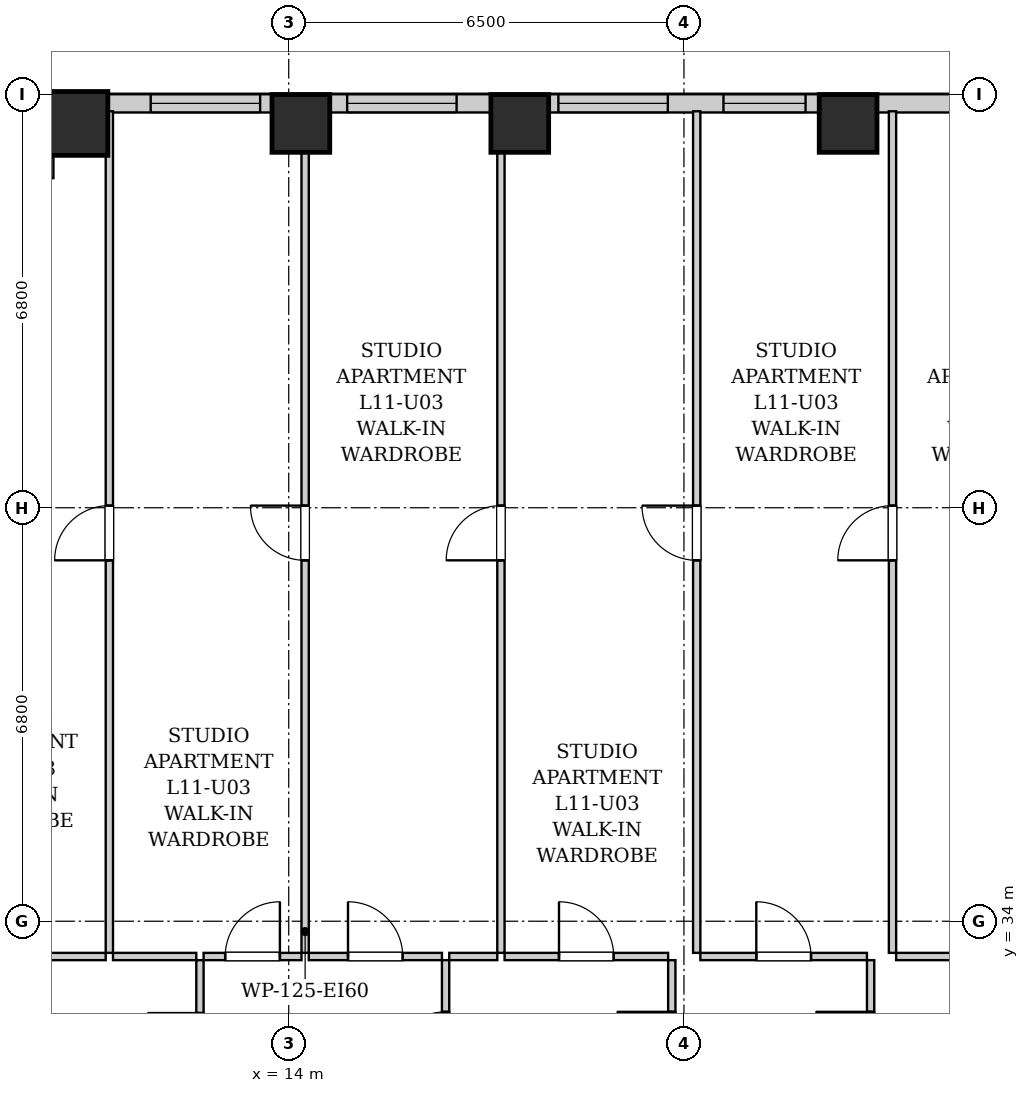
"""IFC4 building model, lengths in metres.
Left out: names, types, materials, properties, quantities, classifications, styles, units other than length and angle.
Written with IfcOpenShell. Run it as: python <this file> out.ifc"""

import sys

from ifc_helpers import new_model, si_unit, direction, frame, frame_2d, origin, origin_2d, place, context, subcontext, project, spatial, rectangle, extrude, element, fill, save


model = new_model("IFC4")
c1 = context("Model", 3, precision=1e-05, world=origin(), true_north=direction((0.0, 1.0)))
c2 = subcontext(c1, "Body", "Model", "MODEL_VIEW")
j1 = project(units=[si_unit("LENGTHUNIT", "METRE"), si_unit("PLANEANGLEUNIT", "RADIAN")], contexts=[c1])
p1 = place(None, origin())
s1 = spatial("IfcSite", under=j1, at=p1, CompositionType="ELEMENT")
p2 = place(p1, origin())
s2 = spatial("IfcBuilding", under=s1, at=p2, CompositionType="ELEMENT")
p3 = place(p2, frame((0.0, 0.0, 45.0)))
s3 = spatial("IfcBuildingStorey", under=s2, at=p3, CompositionType="ELEMENT", Elevation=45.0)
p4 = place(p3, frame((10.5, 47.12, 0.0), z_axis=(0.0, 0.0, 1.0), x_axis=(1.0, 0.0, 0.0)))
e1 = element("IfcColumn", 1, at=p4, inside=s3, PredefinedType="COLUMN", context=c2, shape_type="SweptSolid", body=[
    extrude(rectangle(XDim=1.05, YDim=1.05, at=origin_2d()), origin(), (0.0, 0.0, 1.0), 3.2),
])
for number, where, z_axis, x_axis in (
    (2, (14.2, 47.12, 0.0), (0.0, 0.0, 1.0), (1.0, 0.0, 0.0)),
    (3, (17.8, 47.12, 0.0), (0.0, 0.0, 1.0), (1.0, 0.0, 0.0)),
    (4, (23.2, 47.12, 0.0), (0.0, 0.0, 1.0), (1.0, 0.0, 0.0)),
):
    element("IfcColumn", number, at=place(p3, frame(where, z_axis=z_axis, x_axis=x_axis)), inside=s3, PredefinedType="COLUMN", context=c2, shape_type="SweptSolid", body=[
        extrude(rectangle(XDim=0.95, YDim=0.95, at=origin_2d()), origin(), (0.0, 0.0, 1.0), 3.2),
    ])
p5 = place(p3, frame((10.0, 47.45, 0.0), z_axis=(0.0, 0.0, 1.0), x_axis=(1.0, 0.0, 0.0)))
e5 = element("IfcWall", 5, at=p5, inside=s3, PredefinedType="SOLIDWALL", context=c2, shape_type="SweptSolid", body=[
    extrude(rectangle(XDim=25.7, YDim=0.3, at=frame_2d((12.85, 0.0))), origin(), (0.0, 0.0, 1.0), 1.975),
])
p6 = place(p5, frame((1.73, 0.0, 0.55)))
e6 = element("IfcOpeningElement", 6, at=p6, cuts=e5, PredefinedType="OPENING", context=c2, shape_type="SweptSolid", body=[
    extrude(rectangle(XDim=1.8, YDim=1.2, at=frame_2d((0.9, 0.6))), frame((0.0, 0.16, 0.0), z_axis=(0.0, -1.0, 0.0), x_axis=(1.0, 0.0, 0.0)), (0.0, 0.0, 1.0), 0.32),
])
p7 = place(p5, frame((4.961, 0.0, 0.55)))
e7 = element("IfcOpeningElement", 7, at=p7, cuts=e5, PredefinedType="OPENING", context=c2, shape_type="SweptSolid", body=[
    extrude(rectangle(XDim=1.8, YDim=1.2, at=frame_2d((0.9, 0.6))), frame((0.0, 0.16, 0.0), z_axis=(0.0, -1.0, 0.0), x_axis=(1.0, 0.0, 0.0)), (0.0, 0.0, 1.0), 0.32),
])
p8 = place(p5, frame((8.435, 0.0, 0.55)))
e8 = element("IfcOpeningElement", 8, at=p8, cuts=e5, PredefinedType="OPENING", context=c2, shape_type="SweptSolid", body=[
    extrude(rectangle(XDim=1.8, YDim=1.2, at=frame_2d((0.9, 0.6))), frame((0.0, 0.16, 0.0), z_axis=(0.0, -1.0, 0.0), x_axis=(1.0, 0.0, 0.0)), (0.0, 0.0, 1.0), 0.32),
])
p9 = place(p5, frame((11.15, 0.0, 0.55)))
e9 = element("IfcOpeningElement", 9, at=p9, cuts=e5, PredefinedType="OPENING", context=c2, shape_type="SweptSolid", body=[
    extrude(rectangle(XDim=1.35, YDim=1.2, at=frame_2d((0.675, 0.6))), frame((0.0, 0.16, 0.0), z_axis=(0.0, -1.0, 0.0), x_axis=(1.0, 0.0, 0.0)), (0.0, 0.0, 1.0), 0.32),
])
p10 = place(p5, frame((17.812, 0.0, 0.55)))
e10 = element("IfcOpeningElement", 10, at=p10, cuts=e5, PredefinedType="OPENING", context=c2, shape_type="SweptSolid", body=[
    extrude(rectangle(XDim=1.8, YDim=1.2, at=frame_2d((0.9, 0.6))), frame((0.0, 0.16, 0.0), z_axis=(0.0, -1.0, 0.0), x_axis=(1.0, 0.0, 0.0)), (0.0, 0.0, 1.0), 0.32),
])
p11 = place(p5, frame((20.765, 0.0, 0.55)))
e11 = element("IfcOpeningElement", 11, at=p11, cuts=e5, PredefinedType="OPENING", context=c2, shape_type="SweptSolid", body=[
    extrude(rectangle(XDim=1.8, YDim=1.2, at=frame_2d((0.9, 0.6))), frame((0.0, 0.16, 0.0), z_axis=(0.0, -1.0, 0.0), x_axis=(1.0, 0.0, 0.0)), (0.0, 0.0, 1.0), 0.32),
])
p12 = place(p5, frame((23.835, 0.0, 0.55)))
e12 = element("IfcOpeningElement", 12, at=p12, cuts=e5, PredefinedType="OPENING", context=c2, shape_type="SweptSolid", body=[
    extrude(rectangle(XDim=1.35, YDim=1.2, at=frame_2d((0.675, 0.6))), frame((0.0, 0.16, 0.0), z_axis=(0.0, -1.0, 0.0), x_axis=(1.0, 0.0, 0.0)), (0.0, 0.0, 1.0), 0.32),
])
p13 = place(p3, frame((10.0, 46.22, 0.0), z_axis=(0.0, 0.0, 1.0), x_axis=(0.0, 1.0, 0.0)))
e13 = element("IfcWall", 13, at=p13, inside=s3, PredefinedType="SOLIDWALL", context=c2, shape_type="SweptSolid", body=[
    extrude(rectangle(XDim=1.078, YDim=0.26, at=frame_2d((0.539, 0.0))), origin(), (0.0, 0.0, 1.0), 2.94),
])
p14 = place(p3, frame((12.54, 30.76, 0.0), z_axis=(0.0, 0.0, 1.0), x_axis=(0.0, 1.0, 0.0)))
e14 = element("IfcWall", 14, at=p14, inside=s3, PredefinedType="PARTITIONING", context=c2, shape_type="SweptSolid", body=[
    extrude(rectangle(XDim=2.6, YDim=0.12, at=frame_2d((1.3, 0.0))), origin(), (0.0, 0.0, 1.0), 2.94),
])
p15 = place(p14, frame((0.87, 0.0, 0.0)))
e15 = element("IfcOpeningElement", 15, at=p15, cuts=e14, PredefinedType="OPENING", context=c2, shape_type="SweptSolid", body=[
    extrude(rectangle(XDim=0.86, YDim=2.05, at=frame_2d((0.43, 1.025))), frame((0.0, 0.07, 0.0), z_axis=(0.0, -1.0, 0.0), x_axis=(1.0, 0.0, 0.0)), (0.0, 0.0, 1.0), 0.14),
])
p16 = place(p3, frame((10.08, 33.42, 0.0), z_axis=(0.0, 0.0, 1.0), x_axis=(1.0, 0.0, 0.0)))
e16 = element("IfcWall", 16, at=p16, inside=s3, PredefinedType="PARTITIONING", context=c2, shape_type="SweptSolid", body=[
    extrude(rectangle(XDim=0.91, YDim=0.12, at=frame_2d((0.455, 0.0))), origin(), (0.0, 0.0, 1.0), 2.94),
])
p17 = place(p3, frame((11.11, 33.42, 0.0), z_axis=(0.0, 0.0, 1.0), x_axis=(1.0, 0.0, 0.0)))
e17 = element("IfcWall", 17, at=p17, inside=s3, PredefinedType="PARTITIONING", context=c2, shape_type="SweptSolid", body=[
    extrude(rectangle(XDim=1.37, YDim=0.12, at=frame_2d((0.685, 0.0))), origin(), (0.0, 0.0, 1.0), 2.94),
])
p18 = place(p3, frame((16.58, 30.76, 0.0), z_axis=(0.0, 0.0, 1.0), x_axis=(0.0, 1.0, 0.0)))
e18 = element("IfcWall", 18, at=p18, inside=s3, PredefinedType="PARTITIONING", context=c2, shape_type="SweptSolid", body=[
    extrude(rectangle(XDim=2.6, YDim=0.12, at=frame_2d((1.3, 0.0))), origin(), (0.0, 0.0, 1.0), 2.94),
])
p19 = place(p18, frame((0.85, 0.0, 0.0)))
e19 = element("IfcOpeningElement", 19, at=p19, cuts=e18, PredefinedType="OPENING", context=c2, shape_type="SweptSolid", body=[
    extrude(rectangle(XDim=0.9, YDim=2.05, at=frame_2d((0.45, 1.025))), frame((0.0, 0.07, 0.0), z_axis=(0.0, -1.0, 0.0), x_axis=(1.0, 0.0, 0.0)), (0.0, 0.0, 1.0), 0.14),
])
p20 = place(p3, frame((12.6, 33.42, 0.0), z_axis=(0.0, 0.0, 1.0), x_axis=(1.0, 0.0, 0.0)))
e20 = element("IfcWall", 20, at=p20, inside=s3, PredefinedType="PARTITIONING", context=c2, shape_type="SweptSolid", body=[
    extrude(rectangle(XDim=1.61, YDim=0.12, at=frame_2d((0.805, 0.0))), origin(), (0.0, 0.0, 1.0), 2.94),
])
p21 = place(p20, frame((0.355, 0.0, 0.0)))
e21 = element("IfcOpeningElement", 21, at=p21, cuts=e20, PredefinedType="OPENING", context=c2, shape_type="SweptSolid", body=[
    extrude(rectangle(XDim=0.9, YDim=2.05, at=frame_2d((0.45, 1.025))), frame((0.0, 0.07, 0.0), z_axis=(0.0, -1.0, 0.0), x_axis=(1.0, 0.0, 0.0)), (0.0, 0.0, 1.0), 0.14),
])
p22 = place(p3, frame((14.33, 33.42, 0.0), z_axis=(0.0, 0.0, 1.0), x_axis=(1.0, 0.0, 0.0)))
e22 = element("IfcWall", 22, at=p22, inside=s3, PredefinedType="PARTITIONING", context=c2, shape_type="SweptSolid", body=[
    extrude(rectangle(XDim=2.19, YDim=0.12, at=frame_2d((1.095, 0.0))), origin(), (0.0, 0.0, 1.0), 2.94),
])
p23 = place(p22, frame((0.645, 0.0, 0.0)))
e23 = element("IfcOpeningElement", 23, at=p23, cuts=e22, PredefinedType="OPENING", context=c2, shape_type="SweptSolid", body=[
    extrude(rectangle(XDim=0.9, YDim=2.05, at=frame_2d((0.45, 1.025))), frame((0.0, 0.07, 0.0), z_axis=(0.0, -1.0, 0.0), x_axis=(1.0, 0.0, 0.0)), (0.0, 0.0, 1.0), 0.14),
])
p24 = place(p3, frame((20.3, 30.76, 0.0), z_axis=(0.0, 0.0, 1.0), x_axis=(0.0, 1.0, 0.0)))
e24 = element("IfcWall", 24, at=p24, inside=s3, PredefinedType="PARTITIONING", context=c2, shape_type="SweptSolid", body=[
    extrude(rectangle(XDim=2.6, YDim=0.12, at=frame_2d((1.3, 0.0))), origin(), (0.0, 0.0, 1.0), 2.94),
])
p25 = place(p24, frame((0.85, 0.0, 0.0)))
e25 = element("IfcOpeningElement", 25, at=p25, cuts=e24, PredefinedType="OPENING", context=c2, shape_type="SweptSolid", body=[
    extrude(rectangle(XDim=0.9, YDim=2.05, at=frame_2d((0.45, 1.025))), frame((0.0, 0.07, 0.0), z_axis=(0.0, -1.0, 0.0), x_axis=(1.0, 0.0, 0.0)), (0.0, 0.0, 1.0), 0.14),
])
p26 = place(p3, frame((16.64, 33.42, 0.0), z_axis=(0.0, 0.0, 1.0), x_axis=(1.0, 0.0, 0.0)))
e26 = element("IfcWall", 26, at=p26, inside=s3, PredefinedType="PARTITIONING", context=c2, shape_type="SweptSolid", body=[
    extrude(rectangle(XDim=0.79, YDim=0.12, at=frame_2d((0.395, 0.0))), origin(), (0.0, 0.0, 1.0), 2.94),
])
p27 = place(p3, frame((17.55, 33.42, 0.0), z_axis=(0.0, 0.0, 1.0), x_axis=(1.0, 0.0, 0.0)))
e27 = element("IfcWall", 27, at=p27, inside=s3, PredefinedType="PARTITIONING", context=c2, shape_type="SweptSolid", body=[
    extrude(rectangle(XDim=2.69, YDim=0.12, at=frame_2d((1.345, 0.0))), origin(), (0.0, 0.0, 1.0), 2.94),
])
p28 = place(p27, frame((0.895, 0.0, 0.0)))
e28 = element("IfcOpeningElement", 28, at=p28, cuts=e27, PredefinedType="OPENING", context=c2, shape_type="SweptSolid", body=[
    extrude(rectangle(XDim=0.9, YDim=2.05, at=frame_2d((0.45, 1.025))), frame((0.0, 0.07, 0.0), z_axis=(0.0, -1.0, 0.0), x_axis=(1.0, 0.0, 0.0)), (0.0, 0.0, 1.0), 0.14),
])
p29 = place(p3, frame((23.57, 30.76, 0.0), z_axis=(0.0, 0.0, 1.0), x_axis=(0.0, 1.0, 0.0)))
e29 = element("IfcWall", 29, at=p29, inside=s3, PredefinedType="PARTITIONING", context=c2, shape_type="SweptSolid", body=[
    extrude(rectangle(XDim=2.6, YDim=0.12, at=frame_2d((1.3, 0.0))), origin(), (0.0, 0.0, 1.0), 2.94),
])
p30 = place(p29, frame((0.85, 0.0, 0.0)))
e30 = element("IfcOpeningElement", 30, at=p30, cuts=e29, PredefinedType="OPENING", context=c2, shape_type="SweptSolid", body=[
    extrude(rectangle(XDim=0.9, YDim=2.05, at=frame_2d((0.45, 1.025))), frame((0.0, 0.07, 0.0), z_axis=(0.0, -1.0, 0.0), x_axis=(1.0, 0.0, 0.0)), (0.0, 0.0, 1.0), 0.14),
])
p31 = place(p3, frame((20.77, 33.42, 0.0), z_axis=(0.0, 0.0, 1.0), x_axis=(1.0, 0.0, 0.0)))
e31 = element("IfcWall", 31, at=p31, inside=s3, PredefinedType="PARTITIONING", context=c2, shape_type="SweptSolid", body=[
    extrude(rectangle(XDim=2.74, YDim=0.12, at=frame_2d((1.37, 0.0))), origin(), (0.0, 0.0, 1.0), 2.94),
])
p32 = place(p31, frame((0.92, 0.0, 0.0)))
e32 = element("IfcOpeningElement", 32, at=p32, cuts=e31, PredefinedType="OPENING", context=c2, shape_type="SweptSolid", body=[
    extrude(rectangle(XDim=0.9, YDim=2.05, at=frame_2d((0.45, 1.025))), frame((0.0, 0.07, 0.0), z_axis=(0.0, -1.0, 0.0), x_axis=(1.0, 0.0, 0.0)), (0.0, 0.0, 1.0), 0.14),
])
p33 = place(p3, frame((23.99, 33.42, 0.0), z_axis=(0.0, 0.0, 1.0), x_axis=(1.0, 0.0, 0.0)))
e33 = element("IfcWall", 33, at=p33, inside=s3, PredefinedType="PARTITIONING", context=c2, shape_type="SweptSolid", body=[
    extrude(rectangle(XDim=3.1, YDim=0.12, at=frame_2d((1.55, 0.0))), origin(), (0.0, 0.0, 1.0), 2.94),
])
p34 = place(p33, frame((1.1, 0.0, 0.0)))
e34 = element("IfcOpeningElement", 34, at=p34, cuts=e33, PredefinedType="OPENING", context=c2, shape_type="SweptSolid", body=[
    extrude(rectangle(XDim=0.9, YDim=2.05, at=frame_2d((0.45, 1.025))), frame((0.0, 0.07, 0.0), z_axis=(0.0, -1.0, 0.0), x_axis=(1.0, 0.0, 0.0)), (0.0, 0.0, 1.0), 0.14),
])
p35 = place(p3, frame((11.05, 33.48, 0.0), z_axis=(0.0, 0.0, 1.0), x_axis=(0.0, 1.0, 0.0)))
e35 = element("IfcWall", 35, at=p35, inside=s3, PredefinedType="PARTITIONING", context=c2, shape_type="SweptSolid", body=[
    extrude(rectangle(XDim=13.84, YDim=0.12, at=frame_2d((6.92, 0.0))), origin(), (0.0, 0.0, 1.0), 2.94),
])
p36 = place(p35, frame((6.455, 0.0, 0.0)))
e36 = element("IfcOpeningElement", 36, at=p36, cuts=e35, PredefinedType="OPENING", context=c2, shape_type="SweptSolid", body=[
    extrude(rectangle(XDim=0.9, YDim=2.05, at=frame_2d((0.45, 1.025))), frame((0.0, 0.07, 0.0), z_axis=(0.0, -1.0, 0.0), x_axis=(1.0, 0.0, 0.0)), (0.0, 0.0, 1.0), 0.14),
])
p37 = place(p3, frame((14.27, 33.48, 0.0), z_axis=(0.0, 0.0, 1.0), x_axis=(0.0, 1.0, 0.0)))
e37 = element("IfcWall", 37, at=p37, inside=s3, PredefinedType="PARTITIONING", context=c2, shape_type="SweptSolid", body=[
    extrude(rectangle(XDim=13.84, YDim=0.12, at=frame_2d((6.92, 0.0))), origin(), (0.0, 0.0, 1.0), 2.94),
])
p38 = place(p37, frame((6.455, 0.0, 0.0)))
e38 = element("IfcOpeningElement", 38, at=p38, cuts=e37, PredefinedType="OPENING", context=c2, shape_type="SweptSolid", body=[
    extrude(rectangle(XDim=0.9, YDim=2.05, at=frame_2d((0.45, 1.025))), frame((0.0, 0.07, 0.0), z_axis=(0.0, -1.0, 0.0), x_axis=(1.0, 0.0, 0.0)), (0.0, 0.0, 1.0), 0.14),
])
p39 = place(p3, frame((17.49, 33.48, 0.0), z_axis=(0.0, 0.0, 1.0), x_axis=(0.0, 1.0, 0.0)))
e39 = element("IfcWall", 39, at=p39, inside=s3, PredefinedType="PARTITIONING", context=c2, shape_type="SweptSolid", body=[
    extrude(rectangle(XDim=13.84, YDim=0.12, at=frame_2d((6.92, 0.0))), origin(), (0.0, 0.0, 1.0), 2.94),
])
p40 = place(p39, frame((6.455, 0.0, 0.0)))
e40 = element("IfcOpeningElement", 40, at=p40, cuts=e39, PredefinedType="OPENING", context=c2, shape_type="SweptSolid", body=[
    extrude(rectangle(XDim=0.9, YDim=2.05, at=frame_2d((0.45, 1.025))), frame((0.0, 0.07, 0.0), z_axis=(0.0, -1.0, 0.0), x_axis=(1.0, 0.0, 0.0)), (0.0, 0.0, 1.0), 0.14),
])
p41 = place(p3, frame((20.71, 33.48, 0.0), z_axis=(0.0, 0.0, 1.0), x_axis=(0.0, 1.0, 0.0)))
e41 = element("IfcWall", 41, at=p41, inside=s3, PredefinedType="PARTITIONING", context=c2, shape_type="SweptSolid", body=[
    extrude(rectangle(XDim=13.84, YDim=0.12, at=frame_2d((6.92, 0.0))), origin(), (0.0, 0.0, 1.0), 2.94),
])
p42 = place(p41, frame((6.455, 0.0, 0.0)))
e42 = element("IfcOpeningElement", 42, at=p42, cuts=e41, PredefinedType="OPENING", context=c2, shape_type="SweptSolid", body=[
    extrude(rectangle(XDim=0.9, YDim=2.05, at=frame_2d((0.45, 1.025))), frame((0.0, 0.07, 0.0), z_axis=(0.0, -1.0, 0.0), x_axis=(1.0, 0.0, 0.0)), (0.0, 0.0, 1.0), 0.14),
])
p43 = place(p3, frame((23.93, 33.48, 0.0), z_axis=(0.0, 0.0, 1.0), x_axis=(0.0, 1.0, 0.0)))
e43 = element("IfcWall", 43, at=p43, inside=s3, PredefinedType="PARTITIONING", context=c2, shape_type="SweptSolid", body=[
    extrude(rectangle(XDim=13.84, YDim=0.12, at=frame_2d((6.92, 0.0))), origin(), (0.0, 0.0, 1.0), 2.94),
])
p44 = place(p43, frame((6.455, 0.0, 0.0)))
e44 = element("IfcOpeningElement", 44, at=p44, cuts=e43, PredefinedType="OPENING", context=c2, shape_type="SweptSolid", body=[
    extrude(rectangle(XDim=0.9, YDim=2.05, at=frame_2d((0.45, 1.025))), frame((0.0, 0.07, 0.0), z_axis=(0.0, -1.0, 0.0), x_axis=(1.0, 0.0, 0.0)), (0.0, 0.0, 1.0), 0.14),
])
p45 = place(p15, origin())
e45 = element("IfcDoor", 45, at=p45, inside=s3, OperationType="SINGLE_SWING_RIGHT", PredefinedType="DOOR", context=c2, shape_type="SweptSolid", body=[
    extrude(rectangle(XDim=0.86, YDim=2.05, at=frame_2d((0.43, 1.025))), frame((0.0, 0.025, 0.0), z_axis=(0.0, -1.0, 0.0), x_axis=(1.0, 0.0, 0.0)), (0.0, 0.0, 1.0), 0.05),
])
fill(e15, e45)
p46 = place(p19, origin())
e46 = element("IfcDoor", 46, at=p46, inside=s3, OperationType="SINGLE_SWING_LEFT", PredefinedType="DOOR", context=c2, shape_type="SweptSolid", body=[
    extrude(rectangle(XDim=0.9, YDim=2.05, at=frame_2d((0.45, 1.025))), frame((0.0, 0.025, 0.0), z_axis=(0.0, -1.0, 0.0), x_axis=(1.0, 0.0, 0.0)), (0.0, 0.0, 1.0), 0.05),
])
fill(e19, e46)
p47 = place(p21, origin())
e47 = element("IfcDoor", 47, at=p47, inside=s3, OperationType="SINGLE_SWING_RIGHT", PredefinedType="DOOR", context=c2, shape_type="SweptSolid", body=[
    extrude(rectangle(XDim=0.9, YDim=2.05, at=frame_2d((0.45, 1.025))), frame((0.0, 0.025, 0.0), z_axis=(0.0, -1.0, 0.0), x_axis=(1.0, 0.0, 0.0)), (0.0, 0.0, 1.0), 0.05),
])
fill(e21, e47)
p48 = place(p23, origin())
e48 = element("IfcDoor", 48, at=p48, inside=s3, OperationType="SINGLE_SWING_LEFT", PredefinedType="DOOR", context=c2, shape_type="SweptSolid", body=[
    extrude(rectangle(XDim=0.9, YDim=2.05, at=frame_2d((0.45, 1.025))), frame((0.0, 0.025, 0.0), z_axis=(0.0, -1.0, 0.0), x_axis=(1.0, 0.0, 0.0)), (0.0, 0.0, 1.0), 0.05),
])
fill(e23, e48)
p49 = place(p25, origin())
e49 = element("IfcDoor", 49, at=p49, inside=s3, OperationType="SINGLE_SWING_RIGHT", PredefinedType="DOOR", context=c2, shape_type="SweptSolid", body=[
    extrude(rectangle(XDim=0.9, YDim=2.05, at=frame_2d((0.45, 1.025))), frame((0.0, 0.025, 0.0), z_axis=(0.0, -1.0, 0.0), x_axis=(1.0, 0.0, 0.0)), (0.0, 0.0, 1.0), 0.05),
])
fill(e25, e49)
p50 = place(p28, origin())
e50 = element("IfcDoor", 50, at=p50, inside=s3, OperationType="SINGLE_SWING_LEFT", PredefinedType="DOOR", context=c2, shape_type="SweptSolid", body=[
    extrude(rectangle(XDim=0.9, YDim=2.05, at=frame_2d((0.45, 1.025))), frame((0.0, 0.025, 0.0), z_axis=(0.0, -1.0, 0.0), x_axis=(1.0, 0.0, 0.0)), (0.0, 0.0, 1.0), 0.05),
])
fill(e28, e50)
p51 = place(p30, origin())
e51 = element("IfcDoor", 51, at=p51, inside=s3, OperationType="SINGLE_SWING_RIGHT", PredefinedType="DOOR", context=c2, shape_type="SweptSolid", body=[
    extrude(rectangle(XDim=0.9, YDim=2.05, at=frame_2d((0.45, 1.025))), frame((0.0, 0.025, 0.0), z_axis=(0.0, -1.0, 0.0), x_axis=(1.0, 0.0, 0.0)), (0.0, 0.0, 1.0), 0.05),
])
fill(e30, e51)
p52 = place(p32, origin())
e52 = element("IfcDoor", 52, at=p52, inside=s3, OperationType="SINGLE_SWING_LEFT", PredefinedType="DOOR", context=c2, shape_type="SweptSolid", body=[
    extrude(rectangle(XDim=0.9, YDim=2.05, at=frame_2d((0.45, 1.025))), frame((0.0, 0.025, 0.0), z_axis=(0.0, -1.0, 0.0), x_axis=(1.0, 0.0, 0.0)), (0.0, 0.0, 1.0), 0.05),
])
fill(e32, e52)
p53 = place(p36, origin())
e53 = element("IfcDoor", 53, at=p53, inside=s3, OperationType="SINGLE_SWING_LEFT", PredefinedType="DOOR", context=c2, shape_type="SweptSolid", body=[
    extrude(rectangle(XDim=0.9, YDim=2.05, at=frame_2d((0.45, 1.025))), frame((0.0, 0.025, 0.0), z_axis=(0.0, -1.0, 0.0), x_axis=(1.0, 0.0, 0.0)), (0.0, 0.0, 1.0), 0.05),
])
fill(e36, e53)
p54 = place(p38, origin())
e54 = element("IfcDoor", 54, at=p54, inside=s3, OperationType="SINGLE_SWING_RIGHT", PredefinedType="DOOR", context=c2, shape_type="SweptSolid", body=[
    extrude(rectangle(XDim=0.9, YDim=2.05, at=frame_2d((0.45, 1.025))), frame((0.0, 0.025, 0.0), z_axis=(0.0, -1.0, 0.0), x_axis=(1.0, 0.0, 0.0)), (0.0, 0.0, 1.0), 0.05),
])
fill(e38, e54)
p55 = place(p40, origin())
e55 = element("IfcDoor", 55, at=p55, inside=s3, OperationType="SINGLE_SWING_LEFT", PredefinedType="DOOR", context=c2, shape_type="SweptSolid", body=[
    extrude(rectangle(XDim=0.9, YDim=2.05, at=frame_2d((0.45, 1.025))), frame((0.0, 0.025, 0.0), z_axis=(0.0, -1.0, 0.0), x_axis=(1.0, 0.0, 0.0)), (0.0, 0.0, 1.0), 0.05),
])
fill(e40, e55)
p56 = place(p42, origin())
e56 = element("IfcDoor", 56, at=p56, inside=s3, OperationType="SINGLE_SWING_RIGHT", PredefinedType="DOOR", context=c2, shape_type="SweptSolid", body=[
    extrude(rectangle(XDim=0.9, YDim=2.05, at=frame_2d((0.45, 1.025))), frame((0.0, 0.025, 0.0), z_axis=(0.0, -1.0, 0.0), x_axis=(1.0, 0.0, 0.0)), (0.0, 0.0, 1.0), 0.05),
])
fill(e42, e56)
p57 = place(p44, origin())
e57 = element("IfcDoor", 57, at=p57, inside=s3, OperationType="SINGLE_SWING_LEFT", PredefinedType="DOOR", context=c2, shape_type="SweptSolid", body=[
    extrude(rectangle(XDim=0.9, YDim=2.05, at=frame_2d((0.45, 1.025))), frame((0.0, 0.025, 0.0), z_axis=(0.0, -1.0, 0.0), x_axis=(1.0, 0.0, 0.0)), (0.0, 0.0, 1.0), 0.05),
])
fill(e44, e57)
p58 = place(p6, origin())
e58 = element("IfcWindow", 58, at=p58, inside=s3, PartitioningType="DOUBLE_PANEL_VERTICAL", PredefinedType="WINDOW", context=c2, shape_type="SweptSolid", body=[
    extrude(rectangle(XDim=1.8, YDim=1.2, at=frame_2d((0.9, 0.6))), frame((0.0, 0.03, 0.0), z_axis=(0.0, -1.0, 0.0), x_axis=(1.0, 0.0, 0.0)), (0.0, 0.0, 1.0), 0.06),
])
fill(e6, e58)
p59 = place(p7, origin())
e59 = element("IfcWindow", 59, at=p59, inside=s3, PartitioningType="DOUBLE_PANEL_VERTICAL", PredefinedType="WINDOW", context=c2, shape_type="SweptSolid", body=[
    extrude(rectangle(XDim=1.8, YDim=1.2, at=frame_2d((0.9, 0.6))), frame((0.0, 0.03, 0.0), z_axis=(0.0, -1.0, 0.0), x_axis=(1.0, 0.0, 0.0)), (0.0, 0.0, 1.0), 0.06),
])
fill(e7, e59)
p60 = place(p8, origin())
e60 = element("IfcWindow", 60, at=p60, inside=s3, PartitioningType="DOUBLE_PANEL_VERTICAL", PredefinedType="WINDOW", context=c2, shape_type="SweptSolid", body=[
    extrude(rectangle(XDim=1.8, YDim=1.2, at=frame_2d((0.9, 0.6))), frame((0.0, 0.03, 0.0), z_axis=(0.0, -1.0, 0.0), x_axis=(1.0, 0.0, 0.0)), (0.0, 0.0, 1.0), 0.06),
])
fill(e8, e60)
p61 = place(p9, origin())
e61 = element("IfcWindow", 61, at=p61, inside=s3, PartitioningType="SINGLE_PANEL", PredefinedType="WINDOW", context=c2, shape_type="SweptSolid", body=[
    extrude(rectangle(XDim=1.35, YDim=1.2, at=frame_2d((0.675, 0.6))), frame((0.0, 0.03, 0.0), z_axis=(0.0, -1.0, 0.0), x_axis=(1.0, 0.0, 0.0)), (0.0, 0.0, 1.0), 0.06),
])
fill(e9, e61)
save(model, sys.argv[1])
